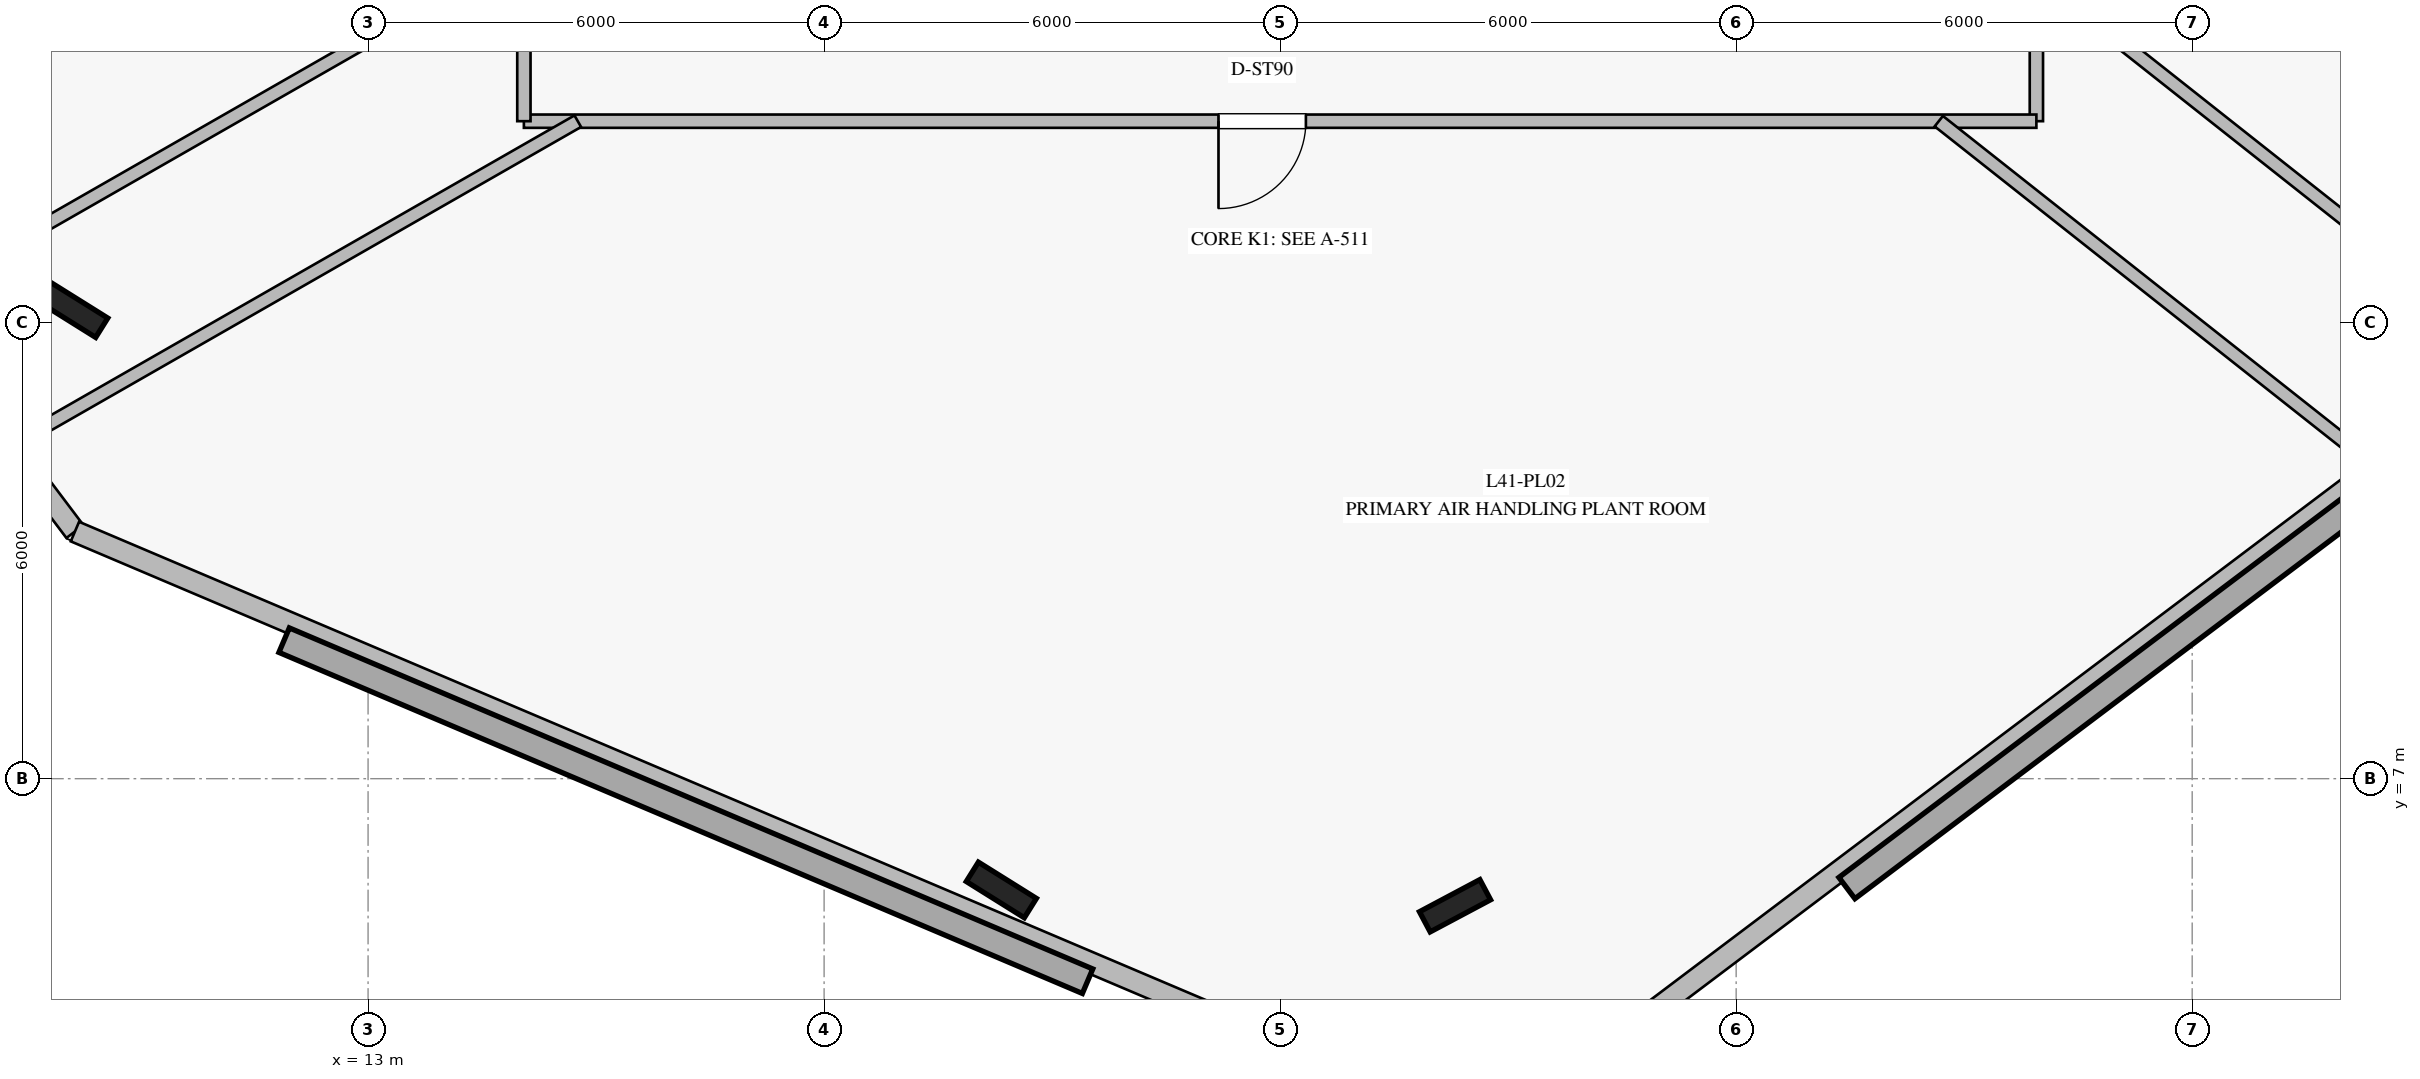
"""IFC4 building model, lengths in metres.
Left out: names, types, materials, properties, quantities, classifications, styles, units other than length and angle.
Written with IfcOpenShell. Run it as: python <this file> out.ifc"""

import sys

from ifc_helpers import new_model, si_unit, direction, frame, frame_2d, origin, origin_2d, place, context, subcontext, project, spatial, rectangle, i_section, extrude, element, fill, save


model = new_model("IFC4")
c1 = context("Model", 3, precision=1e-05, world=origin(), true_north=direction((0.0, 1.0)))
c2 = subcontext(c1, "Body", "Model", "MODEL_VIEW")
j1 = project(units=[si_unit("LENGTHUNIT", "METRE"), si_unit("PLANEANGLEUNIT", "RADIAN")], contexts=[c1])
p1 = place(None, origin())
s1 = spatial("IfcSite", under=j1, at=p1, CompositionType="ELEMENT")
p2 = place(p1, origin())
s2 = spatial("IfcBuilding", under=s1, at=p2, CompositionType="ELEMENT")
p3 = place(p2, frame((0.0, 0.0, 170.4)))
s3 = spatial("IfcBuildingStorey", under=s2, at=p3, CompositionType="ELEMENT", Elevation=170.4)
for number, where, z_axis, x_axis in (
    (1, (9.114, 13.171, 0.0), (0.0, 0.0, 1.0), (-0.848, 0.53, 0.0)),
    (2, (21.332, 5.536, 0.0), (0.0, 0.0, 1.0), (-0.848, 0.53, 0.0)),
    (3, (27.301, 5.328, 0.0), (0.0, 0.0, 1.0), (0.883, 0.469, 0.0)),
):
    element("IfcColumn", number, at=place(p3, frame(where, z_axis=z_axis, x_axis=x_axis)), inside=s3, PredefinedType="COLUMN", context=c2, shape_type="SweptSolid", body=[
        extrude(i_section(OverallWidth=0.3, OverallDepth=0.9, WebThickness=0.019, FlangeThickness=0.035, at=origin_2d()), origin(), (0.0, 0.0, 1.0), 5.4),
    ])
p4 = place(p3, frame((6.452, 13.822, 0.0), z_axis=(0.0, 0.0, 1.0), x_axis=(0.601841660076, -0.798615436989, 0.0)))
e4 = element("IfcWall", 4, at=p4, inside=s3, PredefinedType="STANDARD", context=c2, shape_type="SweptSolid", body=[
    extrude(rectangle(XDim=4.471, YDim=0.28, at=frame_2d((2.236, 0.0))), origin(), (0.0, 0.0, 1.0), 5.14),
])
p5 = place(p3, frame((9.143, 10.251, 0.0), z_axis=(0.0, 0.0, 1.0), x_axis=(0.920507541963, -0.390724794695, 0.0)))
e5 = element("IfcWall", 5, at=p5, inside=s3, PredefinedType="STANDARD", context=c2, shape_type="SweptSolid", body=[
    extrude(rectangle(XDim=17.667, YDim=0.28, at=frame_2d((8.834, 0.0))), origin(), (0.0, 0.0, 1.0), 5.14),
])
p6 = place(p3, frame((29.844, 3.892, 0.0), z_axis=(0.0, 0.0, 1.0), x_axis=(0.798606661406, 0.601853304684, 0.0)))
e6 = element("IfcWall", 6, at=p6, inside=s3, PredefinedType="STANDARD", context=c2, shape_type="SweptSolid", body=[
    extrude(rectangle(XDim=17.668, YDim=0.28, at=frame_2d((8.834, 0.0))), origin(), (0.0, 0.0, 1.0), 5.14),
])
p7 = place(p3, frame((34.95, 34.35, 0.0), z_axis=(0.0, 0.0, 1.0), x_axis=(0.0, -1.0, 0.0)))
e7 = element("IfcWall", 7, at=p7, inside=s3, PredefinedType="PARTITIONING", context=c2, shape_type="SweptSolid", body=[
    extrude(rectangle(XDim=18.7, YDim=0.175, at=frame_2d((9.35, 0.0))), origin(), (0.0, 0.0, 1.0), 3.54),
])
p8 = place(p7, frame((12.525, 0.0, 0.0)))
e8 = element("IfcOpeningElement", 8, at=p8, cuts=e7, PredefinedType="OPENING", context=c2, shape_type="SweptSolid", body=[
    extrude(rectangle(XDim=1.15, YDim=2.2, at=frame_2d((0.575, 1.1))), frame((0.0, 0.098, 0.0), z_axis=(0.0, -1.0, 0.0), x_axis=(1.0, 0.0, 0.0)), (0.0, 0.0, 1.0), 0.195),
])
p9 = place(p7, frame((5.2, 0.0, 0.0)))
e9 = element("IfcOpeningElement", 9, at=p9, cuts=e7, PredefinedType="OPENING", context=c2, shape_type="SweptSolid", body=[
    extrude(rectangle(XDim=1.15, YDim=2.2, at=frame_2d((0.575, 1.1))), frame((0.0, 0.098, 0.0), z_axis=(0.0, -1.0, 0.0), x_axis=(1.0, 0.0, 0.0)), (0.0, 0.0, 1.0), 0.195),
])
p10 = place(p3, frame((34.95, 15.65, 0.0), z_axis=(0.0, 0.0, 1.0), x_axis=(-1.0, 0.0, 0.0)))
e10 = element("IfcWall", 10, at=p10, inside=s3, PredefinedType="PARTITIONING", context=c2, shape_type="SweptSolid", body=[
    extrude(rectangle(XDim=19.9, YDim=0.175, at=frame_2d((9.95, 0.0))), origin(), (0.0, 0.0, 1.0), 3.54),
])
p11 = place(p10, frame((9.611, 0.0, 0.0)))
e11 = element("IfcOpeningElement", 11, at=p11, cuts=e10, PredefinedType="OPENING", context=c2, shape_type="SweptSolid", body=[
    extrude(rectangle(XDim=1.15, YDim=2.2, at=frame_2d((0.575, 1.1))), frame((0.0, 0.098, 0.0), z_axis=(0.0, -1.0, 0.0), x_axis=(1.0, 0.0, 0.0)), (0.0, 0.0, 1.0), 0.195),
])
p12 = place(p3, frame((15.05, 15.65, 0.0), z_axis=(0.0, 0.0, 1.0), x_axis=(0.0, 1.0, 0.0)))
e12 = element("IfcWall", 12, at=p12, inside=s3, PredefinedType="PARTITIONING", context=c2, shape_type="SweptSolid", body=[
    extrude(rectangle(XDim=18.7, YDim=0.175, at=frame_2d((9.35, 0.0))), origin(), (0.0, 0.0, 1.0), 3.54),
])
p13 = place(p12, frame((5.085, 0.0, 0.0)))
e13 = element("IfcOpeningElement", 13, at=p13, cuts=e12, PredefinedType="OPENING", context=c2, shape_type="SweptSolid", body=[
    extrude(rectangle(XDim=1.2, YDim=2.25, at=frame_2d((0.6, 1.125))), frame((0.0, 0.098, 0.0), z_axis=(0.0, -1.0, 0.0), x_axis=(1.0, 0.0, 0.0)), (0.0, 0.0, 1.0), 0.195),
])
p14 = place(p12, frame((12.525, 0.0, 0.0)))
e14 = element("IfcOpeningElement", 14, at=p14, cuts=e12, PredefinedType="OPENING", context=c2, shape_type="SweptSolid", body=[
    extrude(rectangle(XDim=1.15, YDim=2.2, at=frame_2d((0.575, 1.1))), frame((0.0, 0.098, 0.0), z_axis=(0.0, -1.0, 0.0), x_axis=(1.0, 0.0, 0.0)), (0.0, 0.0, 1.0), 0.195),
])
p15 = place(p3, frame((15.05, 17.894, 0.0), z_axis=(0.0, 0.0, 1.0), x_axis=(-0.867870917182, -0.496789765504, 0.0)))
e15 = element("IfcWall", 15, at=p15, inside=s3, PredefinedType="PARTITIONING", context=c2, shape_type="SweptSolid", body=[
    extrude(rectangle(XDim=9.33, YDim=0.175, at=frame_2d((4.665, 0.0))), origin(), (0.0, 0.0, 1.0), 3.53),
])
p16 = place(p3, frame((15.759, 15.65, 0.0), z_axis=(0.0, 0.0, 1.0), x_axis=(-0.86783997446, -0.49684381724, 0.0)))
e16 = element("IfcWall", 16, at=p16, inside=s3, PredefinedType="PARTITIONING", context=c2, shape_type="SweptSolid", body=[
    extrude(rectangle(XDim=8.54, YDim=0.175, at=frame_2d((4.27, 0.0))), origin(), (0.0, 0.0, 1.0), 3.53),
])
p17 = place(p3, frame((33.666, 15.65, 0.0), z_axis=(0.0, 0.0, 1.0), x_axis=(0.784600993116, -0.620001033549, 0.0)))
e17 = element("IfcWall", 17, at=p17, inside=s3, PredefinedType="PARTITIONING", context=c2, shape_type="SweptSolid", body=[
    extrude(rectangle(XDim=7.254, YDim=0.175, at=frame_2d((3.627, 0.0))), origin(), (0.0, 0.0, 1.0), 3.53),
])
p18 = place(p3, frame((34.95, 17.567, 0.0), z_axis=(0.0, 0.0, 1.0), x_axis=(0.784559222655, -0.620053889712, 0.0)))
e18 = element("IfcWall", 18, at=p18, inside=s3, PredefinedType="PARTITIONING", context=c2, shape_type="SweptSolid", body=[
    extrude(rectangle(XDim=8.038, YDim=0.175, at=frame_2d((4.019, 0.0))), origin(), (0.0, 0.0, 1.0), 3.53),
])
p19 = place(p11, origin())
e19 = element("IfcDoor", 19, at=p19, inside=s3, OperationType="SINGLE_SWING_RIGHT", PredefinedType="DOOR", context=c2, shape_type="SweptSolid", body=[
    extrude(rectangle(XDim=1.15, YDim=2.2, at=frame_2d((0.575, 1.1))), frame((0.0, 0.025, 0.0), z_axis=(0.0, -1.0, 0.0), x_axis=(1.0, 0.0, 0.0)), (0.0, 0.0, 1.0), 0.05),
])
fill(e11, e19)
save(model, sys.argv[1])
